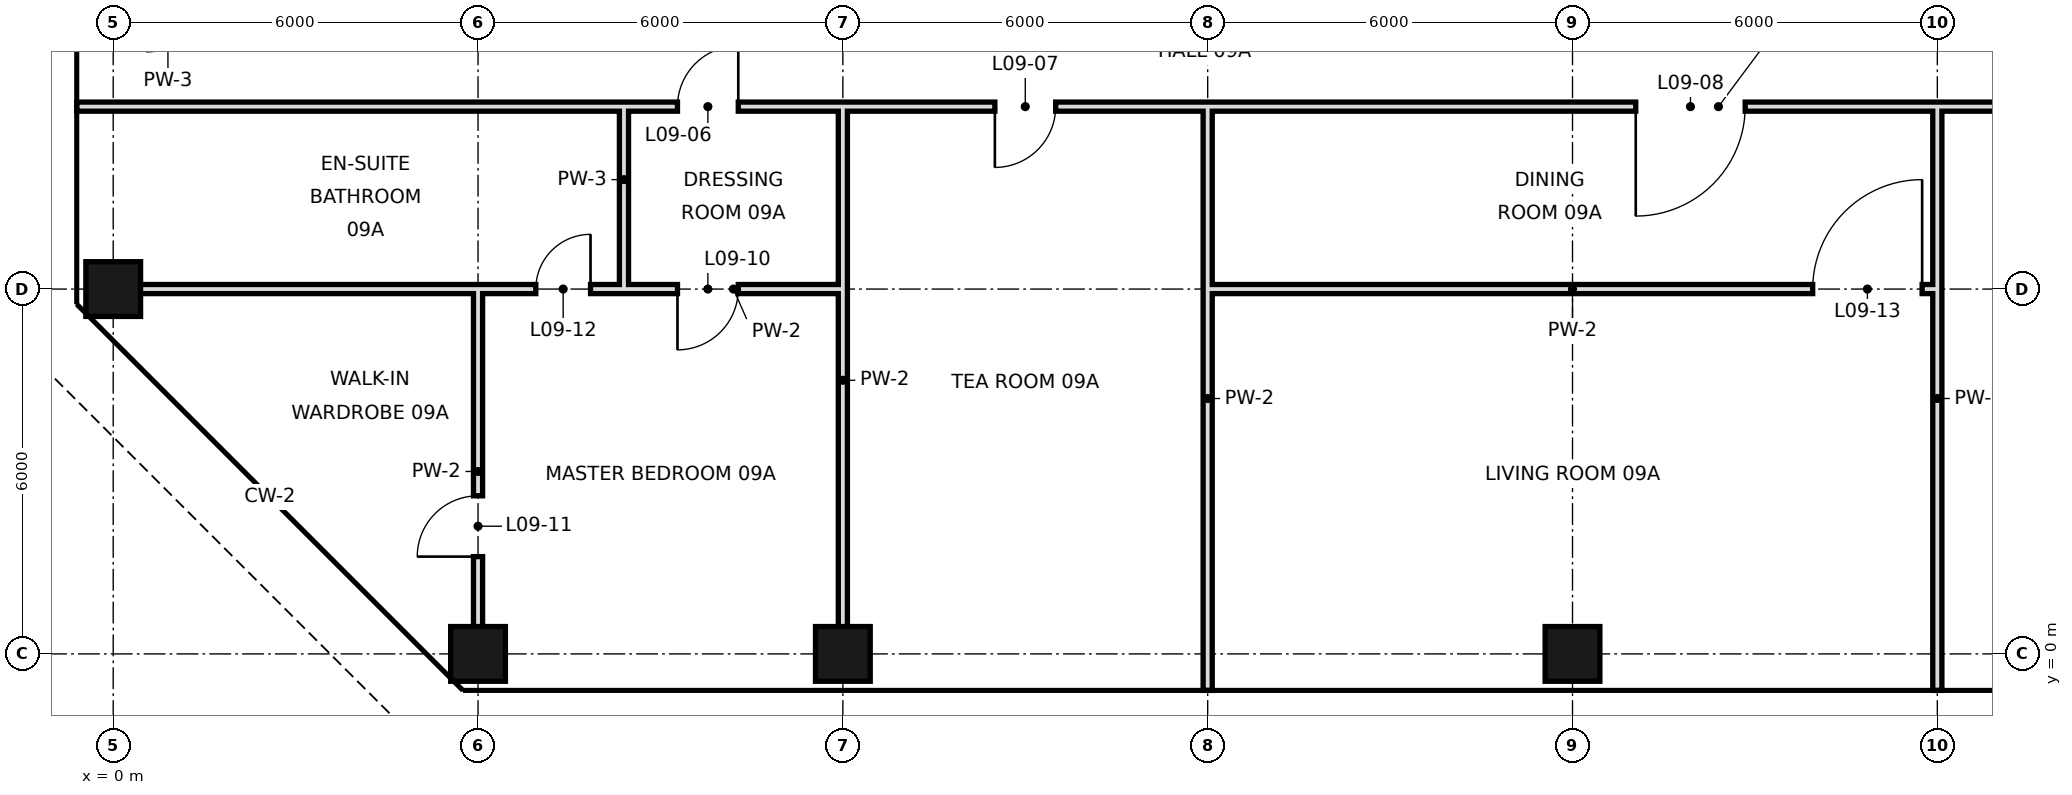
"""IFC4 building model, lengths in metres.
Left out: names, types, materials, properties, quantities, classifications, styles, units other than length and angle.
Written with IfcOpenShell. Run it as: python <this file> out.ifc"""

import sys

from ifc_helpers import new_model, si_unit, direction, frame, frame_2d, origin, origin_2d, place, context, subcontext, project, spatial, rectangle, hollow_rectangle, extrude, element, fill, save


model = new_model("IFC4")
c1 = context("Model", 3, precision=1e-05, world=origin(), true_north=direction((0.0, 1.0)))
c2 = subcontext(c1, "Body", "Model", "MODEL_VIEW")
j1 = project(units=[si_unit("LENGTHUNIT", "METRE"), si_unit("PLANEANGLEUNIT", "RADIAN")], contexts=[c1])
p1 = place(None, origin())
s1 = spatial("IfcSite", under=j1, at=p1, CompositionType="ELEMENT")
p2 = place(p1, origin())
s2 = spatial("IfcBuilding", under=s1, at=p2, CompositionType="ELEMENT")
p3 = place(p2, frame((0.0, 0.0, 53.4)))
s3 = spatial("IfcBuildingStorey", under=s2, at=p3, CompositionType="ELEMENT", Elevation=53.4)
for number, where, z_axis, x_axis in (
    (1, (0.0, 6.0, 0.0), (0.0, 0.0, 1.0), (1.0, 0.0, 0.0)),
    (2, (6.0, 0.0, 0.0), (0.0, 0.0, 1.0), (1.0, 0.0, 0.0)),
    (3, (12.0, 0.0, 0.0), (0.0, 0.0, 1.0), (1.0, 0.0, 0.0)),
    (4, (24.0, 0.0, 0.0), (0.0, 0.0, 1.0), (1.0, 0.0, 0.0)),
):
    element("IfcColumn", number, at=place(p3, frame(where, z_axis=z_axis, x_axis=x_axis)), inside=s3, PredefinedType="COLUMN", context=c2, shape_type="SweptSolid", body=[
        extrude(hollow_rectangle(XDim=0.9, YDim=0.9, WallThickness=0.045, at=origin_2d()), origin(), (0.0, 0.0, 1.0), 3.6),
    ])
p4 = place(p3, frame((12.0, 0.0, 0.0), z_axis=(0.0, 0.0, 1.0), x_axis=(0.0, 1.0, 0.0)))
e5 = element("IfcWall", 5, at=p4, inside=s3, PredefinedType="PARTITIONING", context=c2, shape_type="SweptSolid", body=[
    extrude(rectangle(XDim=9.0, YDim=0.15, at=frame_2d((4.5, 0.0))), origin(), (0.0, 0.0, 1.0), 2.72),
])
for number, where, z_axis, x_axis in (
    (6, (18.0, -0.6, 0.0), (0.0, 0.0, 1.0), (0.0, 1.0, 0.0)),
    (7, (30.0, -0.6, 0.0), (0.0, 0.0, 1.0), (0.0, 1.0, 0.0)),
):
    element("IfcWall", number, at=place(p3, frame(where, z_axis=z_axis, x_axis=x_axis)), inside=s3, PredefinedType="PARTITIONING", context=c2, shape_type="SweptSolid", body=[
        extrude(rectangle(XDim=9.6, YDim=0.15, at=frame_2d((4.8, 0.0))), origin(), (0.0, 0.0, 1.0), 2.72),
    ])
p5 = place(p3, frame((6.0, 0.0, 0.0), z_axis=(0.0, 0.0, 1.0), x_axis=(0.0, 1.0, 0.0)))
e8 = element("IfcWall", 8, at=p5, inside=s3, PredefinedType="PARTITIONING", context=c2, shape_type="SweptSolid", body=[
    extrude(rectangle(XDim=6.0, YDim=0.15, at=frame_2d((3.0, 0.0))), origin(), (0.0, 0.0, 1.0), 2.72),
])
p6 = place(p5, frame((1.6, 0.0, 0.0)))
e9 = element("IfcOpeningElement", 9, at=p6, cuts=e8, PredefinedType="OPENING", context=c2, shape_type="SweptSolid", body=[
    extrude(rectangle(XDim=1.0, YDim=2.4, at=frame_2d((0.5, 1.2))), frame((0.0, 0.085, 0.0), z_axis=(0.0, -1.0, 0.0), x_axis=(1.0, 0.0, 0.0)), (0.0, 0.0, 1.0), 0.17),
])
p7 = place(p3, frame((8.4, 6.0, 0.0), z_axis=(0.0, 0.0, 1.0), x_axis=(0.0, 1.0, 0.0)))
e10 = element("IfcWall", 10, at=p7, inside=s3, PredefinedType="PARTITIONING", context=c2, shape_type="SweptSolid", body=[
    extrude(rectangle(XDim=3.0, YDim=0.15, at=frame_2d((1.5, 0.0))), origin(), (0.0, 0.0, 1.0), 3.42),
])
p8 = place(p3, frame((8.4, 6.0, 0.0), z_axis=(0.0, 0.0, 1.0), x_axis=(1.0, 0.0, 0.0)))
e11 = element("IfcWall", 11, at=p8, inside=s3, PredefinedType="PARTITIONING", context=c2, shape_type="SweptSolid", body=[
    extrude(rectangle(XDim=3.6, YDim=0.15, at=frame_2d((1.8, 0.0))), origin(), (0.0, 0.0, 1.0), 2.97),
])
p9 = place(p8, frame((0.88, 0.0, 0.0)))
e12 = element("IfcOpeningElement", 12, at=p9, cuts=e11, PredefinedType="OPENING", context=c2, shape_type="SweptSolid", body=[
    extrude(rectangle(XDim=1.0, YDim=2.4, at=frame_2d((0.5, 1.2))), frame((0.0, 0.085, 0.0), z_axis=(0.0, -1.0, 0.0), x_axis=(1.0, 0.0, 0.0)), (0.0, 0.0, 1.0), 0.17),
])
p10 = place(p3, frame((18.0, 6.0, 0.0), z_axis=(0.0, 0.0, 1.0), x_axis=(1.0, 0.0, 0.0)))
e13 = element("IfcWall", 13, at=p10, inside=s3, PredefinedType="PARTITIONING", context=c2, shape_type="SweptSolid", body=[
    extrude(rectangle(XDim=12.0, YDim=0.15, at=frame_2d((6.0, 0.0))), origin(), (0.0, 0.0, 1.0), 2.97),
])
p11 = place(p10, frame((9.95, 0.0, 0.0)))
e14 = element("IfcOpeningElement", 14, at=p11, cuts=e13, PredefinedType="OPENING", context=c2, shape_type="SweptSolid", body=[
    extrude(rectangle(XDim=1.8, YDim=2.4, at=frame_2d((0.9, 1.2))), frame((0.0, 0.085, 0.0), z_axis=(0.0, -1.0, 0.0), x_axis=(1.0, 0.0, 0.0)), (0.0, 0.0, 1.0), 0.17),
])
p12 = place(p3, frame((0.0, 6.0, 0.0), z_axis=(0.0, 0.0, 1.0), x_axis=(1.0, 0.0, 0.0)))
e15 = element("IfcWall", 15, at=p12, inside=s3, PredefinedType="PARTITIONING", context=c2, shape_type="SweptSolid", body=[
    extrude(rectangle(XDim=8.4, YDim=0.15, at=frame_2d((4.2, 0.0))), origin(), (0.0, 0.0, 1.0), 2.97),
])
p13 = place(p12, frame((6.95, 0.0, 0.0)))
e16 = element("IfcOpeningElement", 16, at=p13, cuts=e15, PredefinedType="OPENING", context=c2, shape_type="SweptSolid", body=[
    extrude(rectangle(XDim=0.9, YDim=2.4, at=frame_2d((0.45, 1.2))), frame((0.0, 0.085, 0.0), z_axis=(0.0, -1.0, 0.0), x_axis=(1.0, 0.0, 0.0)), (0.0, 0.0, 1.0), 0.17),
])
p14 = place(p3, frame((8.4, 9.0, 0.0), z_axis=(0.0, 0.0, 1.0), x_axis=(1.0, 0.0, 0.0)))
e17 = element("IfcWall", 17, at=p14, inside=s3, PredefinedType="PARTITIONING", context=c2, shape_type="SweptSolid", body=[
    extrude(rectangle(XDim=36.0, YDim=0.15, at=frame_2d((18.0, 0.0))), origin(), (0.0, 0.0, 1.0), 3.42),
])
p15 = place(p14, frame((0.88, 0.0, 0.0)))
e18 = element("IfcOpeningElement", 18, at=p15, cuts=e17, PredefinedType="OPENING", context=c2, shape_type="SweptSolid", body=[
    extrude(rectangle(XDim=1.0, YDim=2.4, at=frame_2d((0.5, 1.2))), frame((0.0, 0.085, 0.0), z_axis=(0.0, -1.0, 0.0), x_axis=(1.0, 0.0, 0.0)), (0.0, 0.0, 1.0), 0.17),
])
p16 = place(p14, frame((6.1, 0.0, 0.0)))
e19 = element("IfcOpeningElement", 19, at=p16, cuts=e17, PredefinedType="OPENING", context=c2, shape_type="SweptSolid", body=[
    extrude(rectangle(XDim=1.0, YDim=2.4, at=frame_2d((0.5, 1.2))), frame((0.0, 0.085, 0.0), z_axis=(0.0, -1.0, 0.0), x_axis=(1.0, 0.0, 0.0)), (0.0, 0.0, 1.0), 0.17),
])
p17 = place(p14, frame((16.64, 0.0, 0.0)))
e20 = element("IfcOpeningElement", 20, at=p17, cuts=e17, PredefinedType="OPENING", context=c2, shape_type="SweptSolid", body=[
    extrude(rectangle(XDim=1.8, YDim=2.4, at=frame_2d((0.9, 1.2))), frame((0.0, 0.085, 0.0), z_axis=(0.0, -1.0, 0.0), x_axis=(1.0, 0.0, 0.0)), (0.0, 0.0, 1.0), 0.17),
])
p18 = place(p14, frame((23.7, 0.0, 0.0)))
e21 = element("IfcOpeningElement", 21, at=p18, cuts=e17, PredefinedType="OPENING", context=c2, shape_type="SweptSolid", body=[
    extrude(rectangle(XDim=1.8, YDim=2.4, at=frame_2d((0.9, 1.2))), frame((0.0, 0.085, 0.0), z_axis=(0.0, -1.0, 0.0), x_axis=(1.0, 0.0, 0.0)), (0.0, 0.0, 1.0), 0.17),
])
p19 = place(p14, frame((30.1, 0.0, 0.0)))
e22 = element("IfcOpeningElement", 22, at=p19, cuts=e17, PredefinedType="OPENING", context=c2, shape_type="SweptSolid", body=[
    extrude(rectangle(XDim=1.0, YDim=2.4, at=frame_2d((0.5, 1.2))), frame((0.0, 0.085, 0.0), z_axis=(0.0, -1.0, 0.0), x_axis=(1.0, 0.0, 0.0)), (0.0, 0.0, 1.0), 0.17),
])
p20 = place(p14, frame((34.12, 0.0, 0.0)))
e23 = element("IfcOpeningElement", 23, at=p20, cuts=e17, PredefinedType="OPENING", context=c2, shape_type="SweptSolid", body=[
    extrude(rectangle(XDim=1.0, YDim=2.4, at=frame_2d((0.5, 1.2))), frame((0.0, 0.085, 0.0), z_axis=(0.0, -1.0, 0.0), x_axis=(1.0, 0.0, 0.0)), (0.0, 0.0, 1.0), 0.17),
])
p21 = place(p3, frame((-0.6, 9.0, 0.0), z_axis=(0.0, 0.0, 1.0), x_axis=(1.0, 0.0, 0.0)))
e24 = element("IfcWall", 24, at=p21, inside=s3, PredefinedType="PARTITIONING", context=c2, shape_type="SweptSolid", body=[
    extrude(rectangle(XDim=9.0, YDim=0.15, at=frame_2d((4.5, 0.0))), origin(), (0.0, 0.0, 1.0), 3.42),
])
p22 = place(p15, frame((1.0, 0.0, 0.0), z_axis=(0.0, 0.0, 1.0), x_axis=(-1.0, 0.0, 0.0)))
e25 = element("IfcDoor", 25, at=p22, inside=s3, OperationType="SINGLE_SWING_LEFT", PredefinedType="DOOR", context=c2, shape_type="SweptSolid", body=[
    extrude(rectangle(XDim=1.0, YDim=2.4, at=frame_2d((0.5, 1.2))), frame((0.0, 0.025, 0.0), z_axis=(0.0, -1.0, 0.0), x_axis=(1.0, 0.0, 0.0)), (0.0, 0.0, 1.0), 0.05),
])
fill(e18, e25)
p23 = place(p16, frame((1.0, 0.0, 0.0), z_axis=(0.0, 0.0, 1.0), x_axis=(-1.0, 0.0, 0.0)))
e26 = element("IfcDoor", 26, at=p23, inside=s3, OperationType="SINGLE_SWING_RIGHT", PredefinedType="DOOR", context=c2, shape_type="SweptSolid", body=[
    extrude(rectangle(XDim=1.0, YDim=2.4, at=frame_2d((0.5, 1.2))), frame((0.0, 0.025, 0.0), z_axis=(0.0, -1.0, 0.0), x_axis=(1.0, 0.0, 0.0)), (0.0, 0.0, 1.0), 0.05),
])
fill(e19, e26)
p24 = place(p17, frame((1.8, 0.0, 0.0), z_axis=(0.0, 0.0, 1.0), x_axis=(-1.0, 0.0, 0.0)))
e27 = element("IfcDoor", 27, at=p24, inside=s3, OperationType="SINGLE_SWING_RIGHT", PredefinedType="DOOR", context=c2, shape_type="SweptSolid", body=[
    extrude(rectangle(XDim=1.8, YDim=2.4, at=frame_2d((0.9, 1.2))), frame((0.0, 0.025, 0.0), z_axis=(0.0, -1.0, 0.0), x_axis=(1.0, 0.0, 0.0)), (0.0, 0.0, 1.0), 0.05),
])
fill(e20, e27)
p25 = place(p9, frame((1.0, 0.0, 0.0), z_axis=(0.0, 0.0, 1.0), x_axis=(-1.0, 0.0, 0.0)))
e28 = element("IfcDoor", 28, at=p25, inside=s3, OperationType="SINGLE_SWING_RIGHT", PredefinedType="DOOR", context=c2, shape_type="SweptSolid", body=[
    extrude(rectangle(XDim=1.0, YDim=2.4, at=frame_2d((0.5, 1.2))), frame((0.0, 0.025, 0.0), z_axis=(0.0, -1.0, 0.0), x_axis=(1.0, 0.0, 0.0)), (0.0, 0.0, 1.0), 0.05),
])
fill(e12, e28)
p26 = place(p6, origin())
e29 = element("IfcDoor", 29, at=p26, inside=s3, OperationType="SINGLE_SWING_LEFT", PredefinedType="DOOR", context=c2, shape_type="SweptSolid", body=[
    extrude(rectangle(XDim=1.0, YDim=2.4, at=frame_2d((0.5, 1.2))), frame((0.0, 0.025, 0.0), z_axis=(0.0, -1.0, 0.0), x_axis=(1.0, 0.0, 0.0)), (0.0, 0.0, 1.0), 0.05),
])
fill(e9, e29)
p27 = place(p13, frame((0.9, 0.0, 0.0), z_axis=(0.0, 0.0, 1.0), x_axis=(-1.0, 0.0, 0.0)))
e30 = element("IfcDoor", 30, at=p27, inside=s3, OperationType="SINGLE_SWING_LEFT", PredefinedType="DOOR", context=c2, shape_type="SweptSolid", body=[
    extrude(rectangle(XDim=0.9, YDim=2.4, at=frame_2d((0.45, 1.2))), frame((0.0, 0.025, 0.0), z_axis=(0.0, -1.0, 0.0), x_axis=(1.0, 0.0, 0.0)), (0.0, 0.0, 1.0), 0.05),
])
fill(e16, e30)
p28 = place(p11, frame((1.8, 0.0, 0.0), z_axis=(0.0, 0.0, 1.0), x_axis=(-1.0, 0.0, 0.0)))
e31 = element("IfcDoor", 31, at=p28, inside=s3, OperationType="SINGLE_SWING_LEFT", PredefinedType="DOOR", context=c2, shape_type="SweptSolid", body=[
    extrude(rectangle(XDim=1.8, YDim=2.4, at=frame_2d((0.9, 1.2))), frame((0.0, 0.025, 0.0), z_axis=(0.0, -1.0, 0.0), x_axis=(1.0, 0.0, 0.0)), (0.0, 0.0, 1.0), 0.05),
])
fill(e14, e31)
save(model, sys.argv[1])
